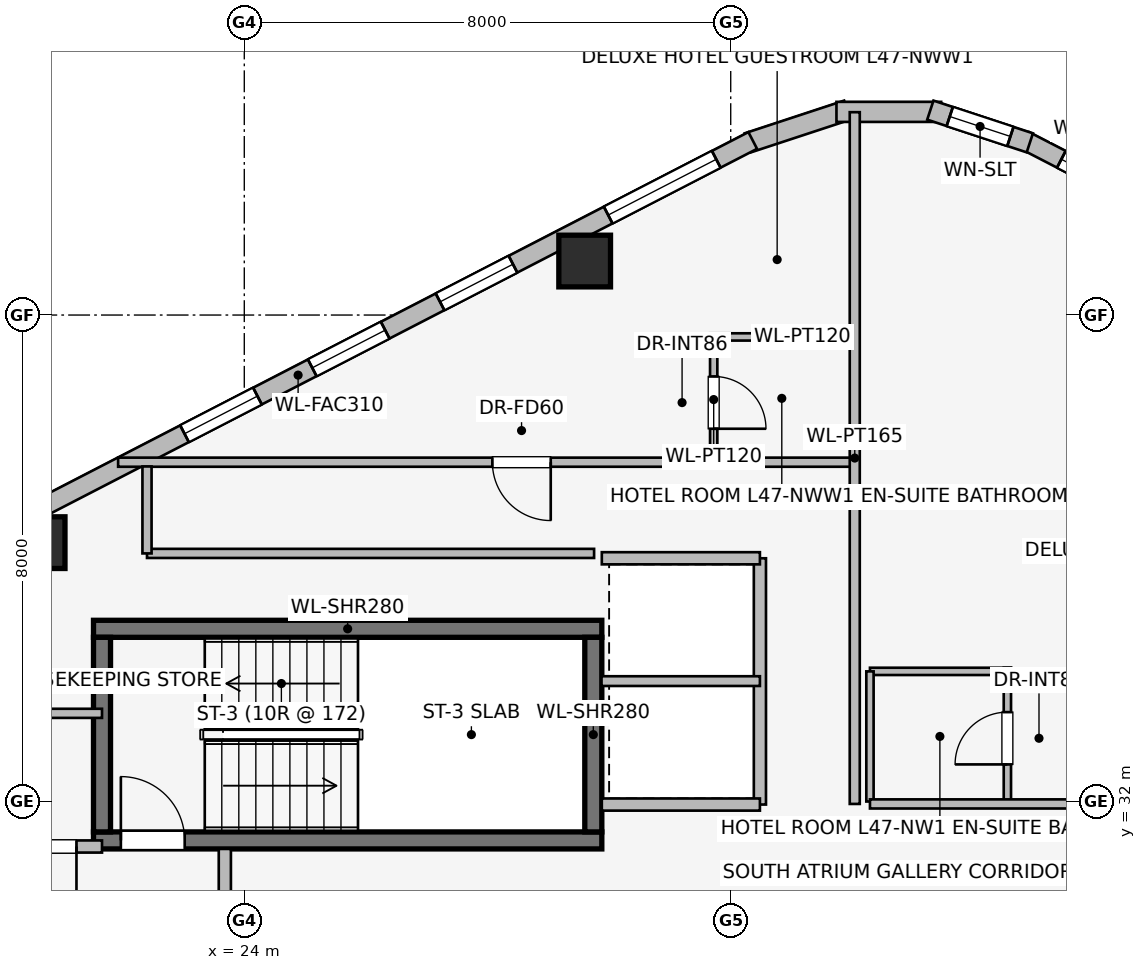
"""IFC4 building model, lengths in metres.
Left out: names, types, materials, properties, quantities, classifications, styles, units other than length and angle.
Written with IfcOpenShell. Run it as: python <this file> out.ifc"""

import sys

from ifc_helpers import new_model, si_unit, direction, frame, frame_2d, origin, origin_2d, place, context, subcontext, project, spatial, rectangle, extrude, element, fill, save


model = new_model("IFC4")
c1 = context("Model", 3, precision=1e-05, world=origin(), true_north=direction((0.0, 1.0)))
c2 = subcontext(c1, "Body", "Model", "MODEL_VIEW")
j1 = project(units=[si_unit("LENGTHUNIT", "METRE"), si_unit("PLANEANGLEUNIT", "RADIAN")], contexts=[c1])
p1 = place(None, origin())
s1 = spatial("IfcSite", under=j1, at=p1, CompositionType="ELEMENT")
p2 = place(p1, origin())
s2 = spatial("IfcBuilding", under=s1, at=p2, CompositionType="ELEMENT")
p3 = place(p2, frame((0.0, 0.0, 174.0)))
s3 = spatial("IfcBuildingStorey", under=s2, at=p3, CompositionType="ELEMENT", Elevation=174.0)
p4 = place(p3, frame((21.52, 31.36, 0.0), z_axis=(0.0, 0.0, 1.0), x_axis=(1.0, 0.0, 0.0)))
e1 = element("IfcWall", 1, at=p4, inside=s3, PredefinedType="SHEAR", context=c2, shape_type="SweptSolid", body=[
    extrude(rectangle(XDim=8.36, YDim=0.28, at=frame_2d((4.18, 0.0))), origin(), (0.0, 0.0, 1.0), 3.45),
])
p5 = place(p4, frame((0.45, 0.0, 0.0)))
e2 = element("IfcOpeningElement", 2, at=p5, cuts=e1, PredefinedType="OPENING", context=c2, shape_type="SweptSolid", body=[
    extrude(rectangle(XDim=1.05, YDim=2.0, at=frame_2d((0.525, 1.0))), frame((0.0, 0.15, 0.0), z_axis=(0.0, -1.0, 0.0), x_axis=(1.0, 0.0, 0.0)), (0.0, 0.0, 1.0), 0.3),
])
p6 = place(p3, frame((29.88, 34.84, 0.0), z_axis=(0.0, 0.0, 1.0), x_axis=(-1.0, 0.0, 0.0)))
e3 = element("IfcWall", 3, at=p6, inside=s3, PredefinedType="SHEAR", context=c2, shape_type="SweptSolid", body=[
    extrude(rectangle(XDim=8.36, YDim=0.28, at=frame_2d((4.18, 0.0))), origin(), (0.0, 0.0, 1.0), 3.45),
])
for number, where, z_axis, x_axis in (
    (4, (21.66, 34.7, 0.0), (0.0, 0.0, 1.0), (0.0, -1.0, 0.0)),
    (5, (29.74, 31.5, 0.0), (0.0, 0.0, 1.0), (0.0, 1.0, 0.0)),
):
    element("IfcWall", number, at=place(p3, frame(where, z_axis=z_axis, x_axis=x_axis)), inside=s3, PredefinedType="SHEAR", context=c2, shape_type="SweptSolid", body=[
        extrude(rectangle(XDim=3.2, YDim=0.28, at=frame_2d((1.6, 0.0))), origin(), (0.0, 0.0, 1.0), 3.45),
    ])
for number, where, z_axis, x_axis in (
    (6, (29.598, 40.888, 0.0), (0.0, 0.0, 1.0), (1.0, 0.0, 0.0)),
    (7, (20.626, 36.257, 0.0), (0.0, 0.0, 1.0), (1.0, 0.0, 0.0)),
):
    element("IfcColumn", number, at=place(p3, frame(where, z_axis=z_axis, x_axis=x_axis)), inside=s3, PredefinedType="COLUMN", context=c2, shape_type="SweptSolid", body=[
        extrude(rectangle(XDim=0.85, YDim=0.85, at=origin_2d()), origin(), (0.0, 0.0, 1.0), 3.45),
    ])
p7 = place(p3, frame((36.838, 42.871, 0.0), z_axis=(0.0, 0.0, 1.0), x_axis=(0.888626188278, -0.458632202867, 0.0)))
e8 = element("IfcWall", 8, at=p7, inside=s3, PredefinedType="STANDARD", context=c2, shape_type="SweptSolid", body=[
    extrude(rectangle(XDim=16.828, YDim=0.31, at=frame_2d((8.414, 0.0))), origin(), (0.0, 0.0, 1.0), 3.16),
])
p8 = place(p7, frame((0.675, 0.0, 0.75)))
e9 = element("IfcOpeningElement", 9, at=p8, cuts=e8, PredefinedType="OPENING", context=c2, shape_type="SweptSolid", body=[
    extrude(rectangle(XDim=2.0, YDim=1.5, at=frame_2d((1.0, 0.75))), frame((0.0, 0.165, 0.0), z_axis=(0.0, -1.0, 0.0), x_axis=(1.0, 0.0, 0.0)), (0.0, 0.0, 1.0), 0.33),
])
p9 = place(p7, frame((4.196, 0.0, 0.75)))
e10 = element("IfcOpeningElement", 10, at=p9, cuts=e8, PredefinedType="OPENING", context=c2, shape_type="SweptSolid", body=[
    extrude(rectangle(XDim=1.35, YDim=1.45, at=frame_2d((0.675, 0.725))), frame((0.0, 0.165, 0.0), z_axis=(0.0, -1.0, 0.0), x_axis=(1.0, 0.0, 0.0)), (0.0, 0.0, 1.0), 0.33),
])
p10 = place(p7, frame((6.078, 0.0, 0.75)))
e11 = element("IfcOpeningElement", 11, at=p10, cuts=e8, PredefinedType="OPENING", context=c2, shape_type="SweptSolid", body=[
    extrude(rectangle(XDim=1.35, YDim=1.45, at=frame_2d((0.675, 0.725))), frame((0.0, 0.165, 0.0), z_axis=(0.0, -1.0, 0.0), x_axis=(1.0, 0.0, 0.0)), (0.0, 0.0, 1.0), 0.33),
])
p11 = place(p7, frame((9.658, 0.0, 0.75)))
e12 = element("IfcOpeningElement", 12, at=p11, cuts=e8, PredefinedType="OPENING", context=c2, shape_type="SweptSolid", body=[
    extrude(rectangle(XDim=2.0, YDim=1.5, at=frame_2d((1.0, 0.75))), frame((0.0, 0.165, 0.0), z_axis=(0.0, -1.0, 0.0), x_axis=(1.0, 0.0, 0.0)), (0.0, 0.0, 1.0), 0.33),
])
p12 = place(p7, frame((14.478, 0.0, 0.75)))
e13 = element("IfcOpeningElement", 13, at=p12, cuts=e8, PredefinedType="OPENING", context=c2, shape_type="SweptSolid", body=[
    extrude(rectangle(XDim=1.35, YDim=1.45, at=frame_2d((0.675, 0.725))), frame((0.0, 0.165, 0.0), z_axis=(0.0, -1.0, 0.0), x_axis=(1.0, 0.0, 0.0)), (0.0, 0.0, 1.0), 0.33),
])
p13 = place(p3, frame((32.281, 42.832, 0.0), z_axis=(0.0, 0.0, 1.0), x_axis=(0.949937416267, 0.312440242569, 0.0)))
e14 = element("IfcWall", 14, at=p13, inside=s3, PredefinedType="STANDARD", context=c2, shape_type="SweptSolid", body=[
    extrude(rectangle(XDim=1.722, YDim=0.33, at=frame_2d((0.861, 0.0))), origin(), (0.0, 0.0, 1.0), 3.16),
])
p14 = place(p3, frame((33.739, 43.341, 0.0), z_axis=(0.0, 0.0, 1.0), x_axis=(1.0, 0.0, 0.0)))
e15 = element("IfcWall", 15, at=p14, inside=s3, PredefinedType="STANDARD", context=c2, shape_type="SweptSolid", body=[
    extrude(rectangle(XDim=1.722, YDim=0.33, at=frame_2d((0.861, 0.0))), origin(), (0.0, 0.0, 1.0), 3.16),
])
p15 = place(p3, frame((35.283, 43.37, 0.0), z_axis=(0.0, 0.0, 1.0), x_axis=(0.949937416267, -0.312440242569, 0.0)))
e16 = element("IfcWall", 16, at=p15, inside=s3, PredefinedType="STANDARD", context=c2, shape_type="SweptSolid", body=[
    extrude(rectangle(XDim=1.722, YDim=0.33, at=frame_2d((0.861, 0.0))), origin(), (0.0, 0.0, 1.0), 3.16),
])
p16 = place(p15, frame((0.336, 0.0, 0.75)))
e17 = element("IfcOpeningElement", 17, at=p16, cuts=e16, PredefinedType="OPENING", context=c2, shape_type="SweptSolid", body=[
    extrude(rectangle(XDim=1.05, YDim=1.4, at=frame_2d((0.525, 0.7))), frame((0.0, 0.175, 0.0), z_axis=(0.0, -1.0, 0.0), x_axis=(1.0, 0.0, 0.0)), (0.0, 0.0, 1.0), 0.35),
])
p17 = place(p3, frame((17.408, 35.153, 0.0), z_axis=(0.0, 0.0, 1.0), x_axis=(0.888626188278, 0.458632202867, 0.0)))
e18 = element("IfcWall", 18, at=p17, inside=s3, PredefinedType="STANDARD", context=c2, shape_type="SweptSolid", body=[
    extrude(rectangle(XDim=16.828, YDim=0.31, at=frame_2d((8.414, 0.0))), origin(), (0.0, 0.0, 1.0), 3.16),
])
p18 = place(p17, frame((0.675, 0.0, 0.75)))
e19 = element("IfcOpeningElement", 19, at=p18, cuts=e18, PredefinedType="OPENING", context=c2, shape_type="SweptSolid", body=[
    extrude(rectangle(XDim=2.0, YDim=1.5, at=frame_2d((1.0, 0.75))), frame((0.0, 0.165, 0.0), z_axis=(0.0, -1.0, 0.0), x_axis=(1.0, 0.0, 0.0)), (0.0, 0.0, 1.0), 0.33),
])
p19 = place(p17, frame((6.312, 0.0, 0.75)))
e20 = element("IfcOpeningElement", 20, at=p19, cuts=e18, PredefinedType="OPENING", context=c2, shape_type="SweptSolid", body=[
    extrude(rectangle(XDim=1.35, YDim=1.45, at=frame_2d((0.675, 0.725))), frame((0.0, 0.165, 0.0), z_axis=(0.0, -1.0, 0.0), x_axis=(1.0, 0.0, 0.0)), (0.0, 0.0, 1.0), 0.33),
])
p20 = place(p17, frame((8.676, 0.0, 0.75)))
e21 = element("IfcOpeningElement", 21, at=p20, cuts=e18, PredefinedType="OPENING", context=c2, shape_type="SweptSolid", body=[
    extrude(rectangle(XDim=1.35, YDim=1.45, at=frame_2d((0.675, 0.725))), frame((0.0, 0.165, 0.0), z_axis=(0.0, -1.0, 0.0), x_axis=(1.0, 0.0, 0.0)), (0.0, 0.0, 1.0), 0.33),
])
p21 = place(p17, frame((11.041, 0.0, 0.75)))
e22 = element("IfcOpeningElement", 22, at=p21, cuts=e18, PredefinedType="OPENING", context=c2, shape_type="SweptSolid", body=[
    extrude(rectangle(XDim=1.35, YDim=1.45, at=frame_2d((0.675, 0.725))), frame((0.0, 0.165, 0.0), z_axis=(0.0, -1.0, 0.0), x_axis=(1.0, 0.0, 0.0)), (0.0, 0.0, 1.0), 0.33),
])
p22 = place(p17, frame((14.153, 0.0, 0.75)))
e23 = element("IfcOpeningElement", 23, at=p22, cuts=e18, PredefinedType="OPENING", context=c2, shape_type="SweptSolid", body=[
    extrude(rectangle(XDim=2.0, YDim=1.5, at=frame_2d((1.0, 0.75))), frame((0.0, 0.165, 0.0), z_axis=(0.0, -1.0, 0.0), x_axis=(1.0, 0.0, 0.0)), (0.0, 0.0, 1.0), 0.33),
])
p23 = place(p3, frame((23.68, 25.68, 0.0), z_axis=(0.0, 0.0, 1.0), x_axis=(0.0, 1.0, 0.0)))
e24 = element("IfcWall", 24, at=p23, inside=s3, PredefinedType="PARTITIONING", context=c2, shape_type="SweptSolid", body=[
    extrude(rectangle(XDim=5.54, YDim=0.2, at=frame_2d((2.77, 0.0))), origin(), (0.0, 0.0, 1.0), 3.16),
])
p24 = place(p23, frame((1.8, 0.0, 0.0)))
e25 = element("IfcOpeningElement", 25, at=p24, cuts=e24, PredefinedType="OPENING", context=c2, shape_type="SweptSolid", body=[
    extrude(rectangle(XDim=1.05, YDim=2.0, at=frame_2d((0.525, 1.0))), frame((0.0, 0.11, 0.0), z_axis=(0.0, -1.0, 0.0), x_axis=(1.0, 0.0, 0.0)), (0.0, 0.0, 1.0), 0.22),
])
p25 = place(p3, frame((21.66, 31.26, 0.0), z_axis=(0.0, 0.0, 1.0), x_axis=(-1.0, 0.0, 0.0)))
e26 = element("IfcWall", 26, at=p25, inside=s3, PredefinedType="PARTITIONING", context=c2, shape_type="SweptSolid", body=[
    extrude(rectangle(XDim=2.01, YDim=0.2, at=frame_2d((1.005, 0.0))), origin(), (0.0, 0.0, 1.0), 3.16),
])
p26 = place(p25, frame((0.42, 0.0, 0.0)))
e27 = element("IfcOpeningElement", 27, at=p26, cuts=e26, PredefinedType="OPENING", context=c2, shape_type="SweptSolid", body=[
    extrude(rectangle(XDim=0.86, YDim=2.0, at=frame_2d((0.43, 1.0))), frame((0.0, 0.11, 0.0), z_axis=(0.0, -1.0, 0.0), x_axis=(1.0, 0.0, 0.0)), (0.0, 0.0, 1.0), 0.22),
])
p27 = place(p3, frame((32.48, 31.95, 0.0), z_axis=(0.0, 0.0, 1.0), x_axis=(0.0, 1.0, 0.0)))
e28 = element("IfcWall", 28, at=p27, inside=s3, PredefinedType="PARTITIONING", context=c2, shape_type="SweptSolid", body=[
    extrude(rectangle(XDim=4.05, YDim=0.2, at=frame_2d((2.025, 0.0))), origin(), (0.0, 0.0, 1.0), 3.16),
])
for number, where, z_axis, x_axis in (
    (29, (29.88, 36.0, 0.0), (0.0, 0.0, 1.0), (1.0, 0.0, 0.0)),
    (30, (32.48, 31.95, 0.0), (0.0, 0.0, 1.0), (-1.0, 0.0, 0.0)),
):
    element("IfcWall", number, at=place(p3, frame(where, z_axis=z_axis, x_axis=x_axis)), inside=s3, PredefinedType="PARTITIONING", context=c2, shape_type="SweptSolid", body=[
        extrude(rectangle(XDim=2.6, YDim=0.2, at=frame_2d((1.3, 0.0))), origin(), (0.0, 0.0, 1.0), 3.16),
    ])
p28 = place(p3, frame((29.875, 33.98, 0.0), z_axis=(0.0, 0.0, 1.0), x_axis=(1.0, 0.0, 0.0)))
e31 = element("IfcWall", 31, at=p28, inside=s3, PredefinedType="PARTITIONING", context=c2, shape_type="SweptSolid", body=[
    extrude(rectangle(XDim=2.605, YDim=0.16, at=frame_2d((1.302, 0.0))), origin(), (0.0, 0.0, 1.0), 3.16),
])
p29 = place(p3, frame((21.66, 33.45, 0.0), z_axis=(0.0, 0.0, 1.0), x_axis=(-1.0, 0.0, 0.0)))
e32 = element("IfcWall", 32, at=p29, inside=s3, PredefinedType="PARTITIONING", context=c2, shape_type="SweptSolid", body=[
    extrude(rectangle(XDim=1.81, YDim=0.15, at=frame_2d((0.905, 0.0))), origin(), (0.0, 0.0, 1.0), 3.16),
])
p30 = place(p3, frame((34.0, 39.64, 0.0), z_axis=(0.0, 0.0, 1.0), x_axis=(-1.0, 0.0, 0.0)))
e33 = element("IfcWall", 33, at=p30, inside=s3, PredefinedType="PARTITIONING", context=c2, shape_type="SweptSolid", body=[
    extrude(rectangle(XDim=2.34, YDim=0.12, at=frame_2d((1.17, 0.0))), origin(), (0.0, 0.0, 1.0), 3.16),
])
p31 = place(p3, frame((31.72, 39.64, 0.0), z_axis=(0.0, 0.0, 1.0), x_axis=(0.0, -1.0, 0.0)))
e34 = element("IfcWall", 34, at=p31, inside=s3, PredefinedType="PARTITIONING", context=c2, shape_type="SweptSolid", body=[
    extrude(rectangle(XDim=2.06, YDim=0.12, at=frame_2d((1.03, 0.0))), origin(), (0.0, 0.0, 1.0), 3.16),
])
p32 = place(p31, frame((0.65, 0.0, 0.0)))
e35 = element("IfcOpeningElement", 35, at=p32, cuts=e34, PredefinedType="OPENING", context=c2, shape_type="SweptSolid", body=[
    extrude(rectangle(XDim=0.86, YDim=2.0, at=frame_2d((0.43, 1.0))), frame((0.0, 0.07, 0.0), z_axis=(0.0, -1.0, 0.0), x_axis=(1.0, 0.0, 0.0)), (0.0, 0.0, 1.0), 0.14),
])
p33 = place(p3, frame((34.0, 37.58, 0.0), z_axis=(0.0, 0.0, 1.0), x_axis=(-1.0, 0.0, 0.0)))
e36 = element("IfcWall", 36, at=p33, inside=s3, PredefinedType="PARTITIONING", context=c2, shape_type="SweptSolid", body=[
    extrude(rectangle(XDim=12.075, YDim=0.15, at=frame_2d((6.038, 0.0))), origin(), (0.0, 0.0, 1.0), 3.16),
])
p34 = place(p33, frame((4.96, 0.0, 0.0)))
e37 = element("IfcOpeningElement", 37, at=p34, cuts=e36, PredefinedType="OPENING", context=c2, shape_type="SweptSolid", body=[
    extrude(rectangle(XDim=0.96, YDim=2.0, at=frame_2d((0.48, 1.0))), frame((0.0, 0.085, 0.0), z_axis=(0.0, -1.0, 0.0), x_axis=(1.0, 0.0, 0.0)), (0.0, 0.0, 1.0), 0.17),
])
p35 = place(p3, frame((34.04, 31.96, 0.0), z_axis=(0.0, 0.0, 1.0), x_axis=(0.0, 1.0, 0.0)))
e38 = element("IfcWall", 38, at=p35, inside=s3, PredefinedType="PARTITIONING", context=c2, shape_type="SweptSolid", body=[
    extrude(rectangle(XDim=11.376, YDim=0.165, at=frame_2d((5.688, 0.0))), origin(), (0.0, 0.0, 1.0), 3.16),
])
p36 = place(p3, frame((36.55, 31.96, 0.0), z_axis=(0.0, 0.0, 1.0), x_axis=(0.0, 1.0, 0.0)))
e39 = element("IfcWall", 39, at=p36, inside=s3, PredefinedType="PARTITIONING", context=c2, shape_type="SweptSolid", body=[
    extrude(rectangle(XDim=2.24, YDim=0.12, at=frame_2d((1.12, 0.0))), origin(), (0.0, 0.0, 1.0), 3.16),
])
p37 = place(p36, frame((0.65, 0.0, 0.0)))
e40 = element("IfcOpeningElement", 40, at=p37, cuts=e39, PredefinedType="OPENING", context=c2, shape_type="SweptSolid", body=[
    extrude(rectangle(XDim=0.86, YDim=2.0, at=frame_2d((0.43, 1.0))), frame((0.0, 0.07, 0.0), z_axis=(0.0, -1.0, 0.0), x_axis=(1.0, 0.0, 0.0)), (0.0, 0.0, 1.0), 0.14),
])
p38 = place(p3, frame((36.61, 34.14, 0.0), z_axis=(0.0, 0.0, 1.0), x_axis=(-1.0, 0.0, 0.0)))
e41 = element("IfcWall", 41, at=p38, inside=s3, PredefinedType="PARTITIONING", context=c2, shape_type="SweptSolid", body=[
    extrude(rectangle(XDim=2.32, YDim=0.12, at=frame_2d((1.16, 0.0))), origin(), (0.0, 0.0, 1.0), 3.16),
])
p39 = place(p3, frame((34.29, 34.14, 0.0), z_axis=(0.0, 0.0, 1.0), x_axis=(0.0, -1.0, 0.0)))
e42 = element("IfcWall", 42, at=p39, inside=s3, PredefinedType="PARTITIONING", context=c2, shape_type="SweptSolid", body=[
    extrude(rectangle(XDim=2.14, YDim=0.12, at=frame_2d((1.07, 0.0))), origin(), (0.0, 0.0, 1.0), 3.16),
])
p40 = place(p3, frame((43.985, 31.96, 0.0), z_axis=(0.0, 0.0, 1.0), x_axis=(-1.0, 0.0, 0.0)))
e43 = element("IfcWall", 43, at=p40, inside=s3, PredefinedType="PARTITIONING", context=c2, shape_type="SweptSolid", body=[
    extrude(rectangle(XDim=9.695, YDim=0.15, at=frame_2d((4.848, 0.0))), origin(), (0.0, 0.0, 1.0), 3.16),
])
p41 = place(p40, frame((3.148, 0.0, 0.0)))
e44 = element("IfcOpeningElement", 44, at=p41, cuts=e43, PredefinedType="OPENING", context=c2, shape_type="SweptSolid", body=[
    extrude(rectangle(XDim=0.96, YDim=2.0, at=frame_2d((0.48, 1.0))), frame((0.0, 0.085, 0.0), z_axis=(0.0, -1.0, 0.0), x_axis=(1.0, 0.0, 0.0)), (0.0, 0.0, 1.0), 0.17),
])
p42 = place(p3, frame((29.753, 36.08, 0.0), z_axis=(0.0, 0.0, 1.0), x_axis=(-1.0, 0.0, 0.0)))
e45 = element("IfcWall", 45, at=p42, inside=s3, PredefinedType="PARTITIONING", context=c2, shape_type="SweptSolid", body=[
    extrude(rectangle(XDim=7.353, YDim=0.15, at=frame_2d((3.677, 0.0))), origin(), (0.0, 0.0, 1.0), 3.16),
])
p43 = place(p3, frame((22.4, 36.08, 0.0), z_axis=(0.0, 0.0, 1.0), x_axis=(0.0, 1.0, 0.0)))
e46 = element("IfcWall", 46, at=p43, inside=s3, PredefinedType="PARTITIONING", context=c2, shape_type="SweptSolid", body=[
    extrude(rectangle(XDim=1.43, YDim=0.15, at=frame_2d((0.715, 0.0))), origin(), (0.0, 0.0, 1.0), 3.16),
])
p44 = place(p8, origin())
e47 = element("IfcWindow", 47, at=p44, inside=s3, PartitioningType="SINGLE_PANEL", PredefinedType="WINDOW", context=c2, shape_type="SweptSolid", body=[
    extrude(rectangle(XDim=2.0, YDim=1.5, at=frame_2d((1.0, 0.75))), frame((0.0, 0.03, 0.0), z_axis=(0.0, -1.0, 0.0), x_axis=(1.0, 0.0, 0.0)), (0.0, 0.0, 1.0), 0.06),
])
fill(e9, e47)
p45 = place(p16, origin())
e48 = element("IfcWindow", 48, at=p45, inside=s3, PartitioningType="SINGLE_PANEL", PredefinedType="WINDOW", context=c2, shape_type="SweptSolid", body=[
    extrude(rectangle(XDim=1.05, YDim=1.4, at=frame_2d((0.525, 0.7))), frame((0.0, 0.03, 0.0), z_axis=(0.0, -1.0, 0.0), x_axis=(1.0, 0.0, 0.0)), (0.0, 0.0, 1.0), 0.06),
])
fill(e17, e48)
p46 = place(p19, origin())
e49 = element("IfcWindow", 49, at=p46, inside=s3, PartitioningType="SINGLE_PANEL", PredefinedType="WINDOW", context=c2, shape_type="SweptSolid", body=[
    extrude(rectangle(XDim=1.35, YDim=1.45, at=frame_2d((0.675, 0.725))), frame((0.0, 0.03, 0.0), z_axis=(0.0, -1.0, 0.0), x_axis=(1.0, 0.0, 0.0)), (0.0, 0.0, 1.0), 0.06),
])
fill(e20, e49)
p47 = place(p20, origin())
e50 = element("IfcWindow", 50, at=p47, inside=s3, PartitioningType="SINGLE_PANEL", PredefinedType="WINDOW", context=c2, shape_type="SweptSolid", body=[
    extrude(rectangle(XDim=1.35, YDim=1.45, at=frame_2d((0.675, 0.725))), frame((0.0, 0.03, 0.0), z_axis=(0.0, -1.0, 0.0), x_axis=(1.0, 0.0, 0.0)), (0.0, 0.0, 1.0), 0.06),
])
fill(e21, e50)
p48 = place(p21, origin())
e51 = element("IfcWindow", 51, at=p48, inside=s3, PartitioningType="SINGLE_PANEL", PredefinedType="WINDOW", context=c2, shape_type="SweptSolid", body=[
    extrude(rectangle(XDim=1.35, YDim=1.45, at=frame_2d((0.675, 0.725))), frame((0.0, 0.03, 0.0), z_axis=(0.0, -1.0, 0.0), x_axis=(1.0, 0.0, 0.0)), (0.0, 0.0, 1.0), 0.06),
])
fill(e22, e51)
p49 = place(p22, origin())
e52 = element("IfcWindow", 52, at=p49, inside=s3, PartitioningType="SINGLE_PANEL", PredefinedType="WINDOW", context=c2, shape_type="SweptSolid", body=[
    extrude(rectangle(XDim=2.0, YDim=1.5, at=frame_2d((1.0, 0.75))), frame((0.0, 0.03, 0.0), z_axis=(0.0, -1.0, 0.0), x_axis=(1.0, 0.0, 0.0)), (0.0, 0.0, 1.0), 0.06),
])
fill(e23, e52)
p50 = place(p5, origin())
e53 = element("IfcDoor", 53, at=p50, inside=s3, OperationType="SINGLE_SWING_LEFT", PredefinedType="DOOR", context=c2, shape_type="SweptSolid", body=[
    extrude(rectangle(XDim=1.05, YDim=2.0, at=frame_2d((0.525, 1.0))), frame((0.0, 0.025, 0.0), z_axis=(0.0, -1.0, 0.0), x_axis=(1.0, 0.0, 0.0)), (0.0, 0.0, 1.0), 0.05),
])
fill(e2, e53)
p51 = place(p26, origin())
e54 = element("IfcDoor", 54, at=p51, inside=s3, OperationType="SINGLE_SWING_LEFT", PredefinedType="DOOR", context=c2, shape_type="SweptSolid", body=[
    extrude(rectangle(XDim=0.86, YDim=2.0, at=frame_2d((0.43, 1.0))), frame((0.0, 0.025, 0.0), z_axis=(0.0, -1.0, 0.0), x_axis=(1.0, 0.0, 0.0)), (0.0, 0.0, 1.0), 0.05),
])
fill(e27, e54)
p52 = place(p32, origin())
e55 = element("IfcDoor", 55, at=p52, inside=s3, OperationType="SINGLE_SWING_RIGHT", PredefinedType="DOOR", context=c2, shape_type="SweptSolid", body=[
    extrude(rectangle(XDim=0.86, YDim=2.0, at=frame_2d((0.43, 1.0))), frame((0.0, 0.025, 0.0), z_axis=(0.0, -1.0, 0.0), x_axis=(1.0, 0.0, 0.0)), (0.0, 0.0, 1.0), 0.05),
])
fill(e35, e55)
p53 = place(p34, origin())
e56 = element("IfcDoor", 56, at=p53, inside=s3, OperationType="SINGLE_SWING_LEFT", PredefinedType="DOOR", context=c2, shape_type="SweptSolid", body=[
    extrude(rectangle(XDim=0.96, YDim=2.0, at=frame_2d((0.48, 1.0))), frame((0.0, 0.025, 0.0), z_axis=(0.0, -1.0, 0.0), x_axis=(1.0, 0.0, 0.0)), (0.0, 0.0, 1.0), 0.05),
])
fill(e37, e56)
p54 = place(p37, origin())
e57 = element("IfcDoor", 57, at=p54, inside=s3, OperationType="SINGLE_SWING_LEFT", PredefinedType="DOOR", context=c2, shape_type="SweptSolid", body=[
    extrude(rectangle(XDim=0.86, YDim=2.0, at=frame_2d((0.43, 1.0))), frame((0.0, 0.025, 0.0), z_axis=(0.0, -1.0, 0.0), x_axis=(1.0, 0.0, 0.0)), (0.0, 0.0, 1.0), 0.05),
])
fill(e40, e57)
save(model, sys.argv[1])
